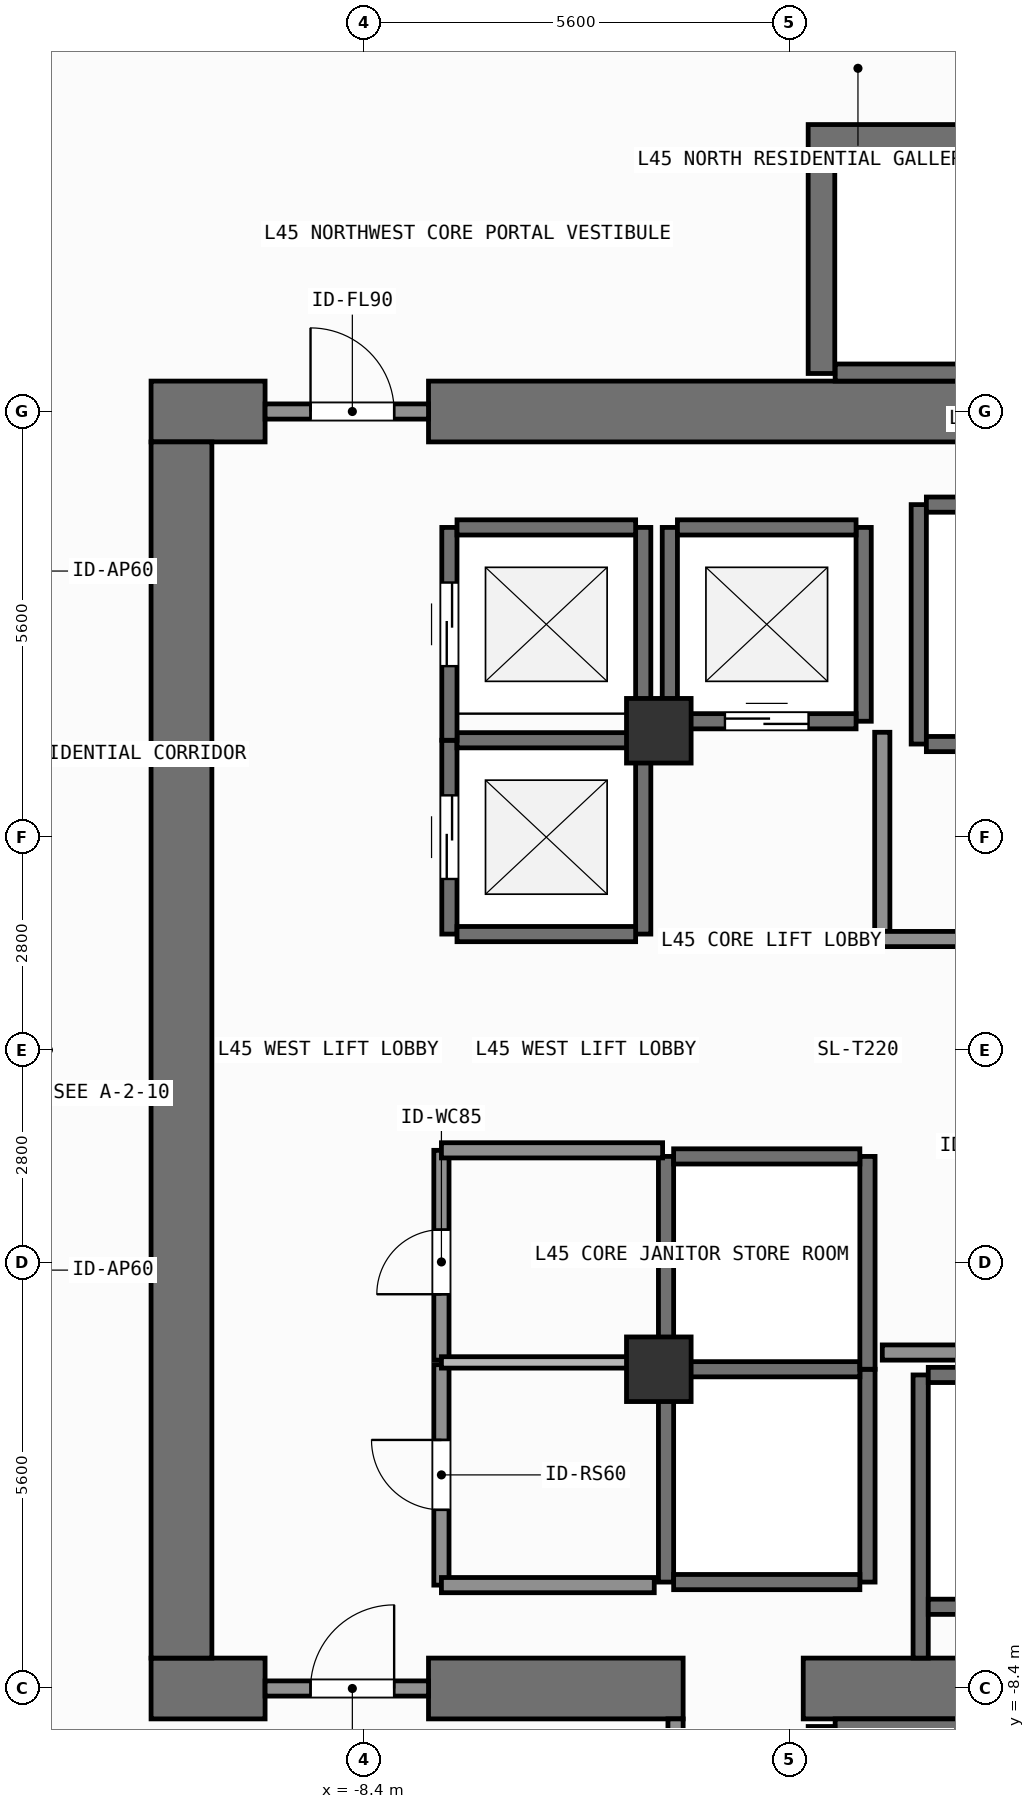
"""IFC4 building model, lengths in metres.
Left out: names, types, materials, properties, quantities, classifications, styles, units other than length and angle.
Written with IfcOpenShell. Run it as: python <this file> out.ifc"""

import sys

from ifc_helpers import new_model, si_unit, direction, frame, frame_2d, origin, origin_2d, place, context, subcontext, project, spatial, rectangle, extrude, element, fill, save


model = new_model("IFC4")
c1 = context("Model", 3, precision=1e-05, world=origin(), true_north=direction((0.0, 1.0)))
c2 = subcontext(c1, "Body", "Model", "MODEL_VIEW")
j1 = project(units=[si_unit("LENGTHUNIT", "METRE"), si_unit("PLANEANGLEUNIT", "RADIAN")], contexts=[c1])
p1 = place(None, origin())
s1 = spatial("IfcSite", under=j1, at=p1, CompositionType="ELEMENT")
p2 = place(p1, origin())
s2 = spatial("IfcBuilding", under=s1, at=p2, CompositionType="ELEMENT")
p3 = place(p2, frame((0.0, 0.0, 183.6)))
s3 = spatial("IfcBuildingStorey", under=s2, at=p3, CompositionType="ELEMENT", Elevation=183.6)
p4 = place(p3, frame((-11.2, -8.4, 0.0), z_axis=(0.0, 0.0, 1.0), x_axis=(1.0, 0.0, 0.0)))
e1 = element("IfcWall", 1, at=p4, inside=s3, PredefinedType="SHEAR", context=c2, shape_type="SweptSolid", body=[
    extrude(rectangle(XDim=1.5, YDim=0.8, at=frame_2d((0.75, 0.0))), origin(), (0.0, 0.0, 1.0), 3.9),
])
p5 = place(p3, frame((-7.55, -8.4, 0.0), z_axis=(0.0, 0.0, 1.0), x_axis=(1.0, 0.0, 0.0)))
e2 = element("IfcWall", 2, at=p5, inside=s3, PredefinedType="SHEAR", context=c2, shape_type="SweptSolid", body=[
    extrude(rectangle(XDim=3.35, YDim=0.8, at=frame_2d((1.675, 0.0))), origin(), (0.0, 0.0, 1.0), 3.9),
])
p6 = place(p3, frame((-2.62, -8.4, 0.0), z_axis=(0.0, 0.0, 1.0), x_axis=(1.0, 0.0, 0.0)))
e3 = element("IfcWall", 3, at=p6, inside=s3, PredefinedType="SHEAR", context=c2, shape_type="SweptSolid", body=[
    extrude(rectangle(XDim=7.27, YDim=0.8, at=frame_2d((3.635, 0.0))), origin(), (0.0, 0.0, 1.0), 3.9),
])
p7 = place(p3, frame((-11.2, 8.4, 0.0), z_axis=(0.0, 0.0, 1.0), x_axis=(1.0, 0.0, 0.0)))
e4 = element("IfcWall", 4, at=p7, inside=s3, PredefinedType="SHEAR", context=c2, shape_type="SweptSolid", body=[
    extrude(rectangle(XDim=1.5, YDim=0.8, at=frame_2d((0.75, 0.0))), origin(), (0.0, 0.0, 1.0), 3.9),
])
p8 = place(p3, frame((-7.55, 8.4, 0.0), z_axis=(0.0, 0.0, 1.0), x_axis=(1.0, 0.0, 0.0)))
e5 = element("IfcWall", 5, at=p8, inside=s3, PredefinedType="SHEAR", context=c2, shape_type="SweptSolid", body=[
    extrude(rectangle(XDim=16.35, YDim=0.8, at=frame_2d((8.175, 0.0))), origin(), (0.0, 0.0, 1.0), 3.9),
])
p9 = place(p3, frame((-10.8, -8.0, 0.0), z_axis=(0.0, 0.0, 1.0), x_axis=(0.0, 1.0, 0.0)))
e6 = element("IfcWall", 6, at=p9, inside=s3, PredefinedType="SHEAR", context=c2, shape_type="SweptSolid", body=[
    extrude(rectangle(XDim=16.0, YDim=0.8, at=frame_2d((8.0, 0.0))), origin(), (0.0, 0.0, 1.0), 3.9),
])
p10 = place(p3, frame((-2.2, -8.913, 0.0), z_axis=(0.0, 0.0, 1.0), x_axis=(1.0, 0.0, 0.0)))
e7 = element("IfcWall", 7, at=p10, inside=s3, PredefinedType="SHEAR", context=c2, shape_type="SweptSolid", body=[
    extrude(rectangle(XDim=6.6, YDim=0.225, at=frame_2d((3.3, 0.0))), origin(), (0.0, 0.0, 1.0), 3.9),
])
p11 = place(p3, frame((-2.38, -11.825, 0.0), z_axis=(0.0, 0.0, 1.0), x_axis=(0.0, 1.0, 0.0)))
e8 = element("IfcWall", 8, at=p11, inside=s3, PredefinedType="SHEAR", context=c2, shape_type="SweptSolid", body=[
    extrude(rectangle(XDim=2.925, YDim=0.35, at=frame_2d((1.462, 0.0))), origin(), (0.0, 0.0, 1.0), 3.9),
])
p12 = place(p3, frame((-2.555, 12.0, 0.0), z_axis=(0.0, 0.0, 1.0), x_axis=(1.0, 0.0, 0.0)))
e9 = element("IfcWall", 9, at=p12, inside=s3, PredefinedType="SHEAR", context=c2, shape_type="SweptSolid", body=[
    extrude(rectangle(XDim=7.31, YDim=0.35, at=frame_2d((3.655, 0.0))), origin(), (0.0, 0.0, 1.0), 3.9),
])
p13 = place(p3, frame((-2.2, 8.913, 0.0), z_axis=(0.0, 0.0, 1.0), x_axis=(1.0, 0.0, 0.0)))
e10 = element("IfcWall", 10, at=p13, inside=s3, PredefinedType="SHEAR", context=c2, shape_type="SweptSolid", body=[
    extrude(rectangle(XDim=6.6, YDim=0.225, at=frame_2d((3.3, 0.0))), origin(), (0.0, 0.0, 1.0), 3.9),
])
p14 = place(p3, frame((-2.38, 8.9, 0.0), z_axis=(0.0, 0.0, 1.0), x_axis=(0.0, 1.0, 0.0)))
e11 = element("IfcWall", 11, at=p14, inside=s3, PredefinedType="SHEAR", context=c2, shape_type="SweptSolid", body=[
    extrude(rectangle(XDim=2.925, YDim=0.35, at=frame_2d((1.462, 0.0))), origin(), (0.0, 0.0, 1.0), 3.9),
])
for number, where, z_axis, x_axis in (
    (12, (-4.52, -4.2, 0.0), (0.0, 0.0, 1.0), (1.0, 0.0, 0.0)),
    (13, (-4.52, 4.2, 0.0), (0.0, 0.0, 1.0), (1.0, 0.0, 0.0)),
):
    element("IfcColumn", number, at=place(p3, frame(where, z_axis=z_axis, x_axis=x_axis)), inside=s3, PredefinedType="COLUMN", context=c2, shape_type="SweptSolid", body=[
        extrude(rectangle(XDim=0.85, YDim=0.85, at=origin_2d()), origin(), (0.0, 0.0, 1.0), 3.9),
    ])
p15 = place(p3, frame((-7.275, 1.525, 0.0), z_axis=(0.0, 0.0, 1.0), x_axis=(0.0, 1.0, 0.0)))
e14 = element("IfcWall", 14, at=p15, inside=s3, PredefinedType="SHEAR", context=c2, shape_type="SweptSolid", body=[
    extrude(rectangle(XDim=2.55, YDim=0.2, at=frame_2d((1.275, 0.0))), origin(), (0.0, 0.0, 1.0), 3.68),
])
p16 = place(p15, frame((0.725, 0.0, 0.0)))
e15 = element("IfcOpeningElement", 15, at=p16, cuts=e14, PredefinedType="OPENING", context=c2, shape_type="SweptSolid", body=[
    extrude(rectangle(XDim=1.1, YDim=2.2, at=frame_2d((0.55, 1.1))), frame((0.0, 0.11, 0.0), z_axis=(0.0, -1.0, 0.0), x_axis=(1.0, 0.0, 0.0)), (0.0, 0.0, 1.0), 0.22),
])
p17 = place(p3, frame((-4.725, 1.525, 0.0), z_axis=(0.0, 0.0, 1.0), x_axis=(0.0, 1.0, 0.0)))
e16 = element("IfcWall", 16, at=p17, inside=s3, PredefinedType="SHEAR", context=c2, shape_type="SweptSolid", body=[
    extrude(rectangle(XDim=2.55, YDim=0.2, at=frame_2d((1.275, 0.0))), origin(), (0.0, 0.0, 1.0), 3.68),
])
for number, where, z_axis, x_axis in (
    (17, (-7.175, 1.525, 0.0), (0.0, 0.0, 1.0), (1.0, 0.0, 0.0)),
    (18, (-7.175, 4.075, 0.0), (0.0, 0.0, 1.0), (1.0, 0.0, 0.0)),
):
    element("IfcWall", number, at=place(p3, frame(where, z_axis=z_axis, x_axis=x_axis)), inside=s3, PredefinedType="SHEAR", context=c2, shape_type="SweptSolid", body=[
        extrude(rectangle(XDim=2.35, YDim=0.2, at=frame_2d((1.175, 0.0))), origin(), (0.0, 0.0, 1.0), 3.68),
    ])
p18 = place(p3, frame((-7.275, 4.075, 0.0), z_axis=(0.0, 0.0, 1.0), x_axis=(0.0, 1.0, 0.0)))
e19 = element("IfcWall", 19, at=p18, inside=s3, PredefinedType="SHEAR", context=c2, shape_type="SweptSolid", body=[
    extrude(rectangle(XDim=2.8, YDim=0.2, at=frame_2d((1.4, 0.0))), origin(), (0.0, 0.0, 1.0), 3.68),
])
p19 = place(p18, frame((0.975, 0.0, 0.0)))
e20 = element("IfcOpeningElement", 20, at=p19, cuts=e19, PredefinedType="OPENING", context=c2, shape_type="SweptSolid", body=[
    extrude(rectangle(XDim=1.1, YDim=2.2, at=frame_2d((0.55, 1.1))), frame((0.0, 0.11, 0.0), z_axis=(0.0, -1.0, 0.0), x_axis=(1.0, 0.0, 0.0)), (0.0, 0.0, 1.0), 0.22),
])
p20 = place(p3, frame((-4.725, 4.075, 0.0), z_axis=(0.0, 0.0, 1.0), x_axis=(0.0, 1.0, 0.0)))
e21 = element("IfcWall", 21, at=p20, inside=s3, PredefinedType="SHEAR", context=c2, shape_type="SweptSolid", body=[
    extrude(rectangle(XDim=2.8, YDim=0.2, at=frame_2d((1.4, 0.0))), origin(), (0.0, 0.0, 1.0), 3.68),
])
p21 = place(p3, frame((-7.175, 6.875, 0.0), z_axis=(0.0, 0.0, 1.0), x_axis=(1.0, 0.0, 0.0)))
e22 = element("IfcWall", 22, at=p21, inside=s3, PredefinedType="SHEAR", context=c2, shape_type="SweptSolid", body=[
    extrude(rectangle(XDim=2.35, YDim=0.2, at=frame_2d((1.175, 0.0))), origin(), (0.0, 0.0, 1.0), 3.68),
])
for number, where, z_axis, x_axis in (
    (23, (-4.375, 4.325, 0.0), (0.0, 0.0, 1.0), (0.0, 1.0, 0.0)),
    (24, (-1.825, 4.325, 0.0), (0.0, 0.0, 1.0), (0.0, 1.0, 0.0)),
):
    element("IfcWall", number, at=place(p3, frame(where, z_axis=z_axis, x_axis=x_axis)), inside=s3, PredefinedType="SHEAR", context=c2, shape_type="SweptSolid", body=[
        extrude(rectangle(XDim=2.55, YDim=0.2, at=frame_2d((1.275, 0.0))), origin(), (0.0, 0.0, 1.0), 3.68),
    ])
p22 = place(p3, frame((-4.275, 4.325, 0.0), z_axis=(0.0, 0.0, 1.0), x_axis=(1.0, 0.0, 0.0)))
e25 = element("IfcWall", 25, at=p22, inside=s3, PredefinedType="SHEAR", context=c2, shape_type="SweptSolid", body=[
    extrude(rectangle(XDim=2.35, YDim=0.2, at=frame_2d((1.175, 0.0))), origin(), (0.0, 0.0, 1.0), 3.68),
])
p23 = place(p22, frame((0.625, 0.0, 0.0)))
e26 = element("IfcOpeningElement", 26, at=p23, cuts=e25, PredefinedType="OPENING", context=c2, shape_type="SweptSolid", body=[
    extrude(rectangle(XDim=1.1, YDim=2.2, at=frame_2d((0.55, 1.1))), frame((0.0, 0.11, 0.0), z_axis=(0.0, -1.0, 0.0), x_axis=(1.0, 0.0, 0.0)), (0.0, 0.0, 1.0), 0.22),
])
p24 = place(p3, frame((-4.275, 6.875, 0.0), z_axis=(0.0, 0.0, 1.0), x_axis=(1.0, 0.0, 0.0)))
e27 = element("IfcWall", 27, at=p24, inside=s3, PredefinedType="SHEAR", context=c2, shape_type="SweptSolid", body=[
    extrude(rectangle(XDim=2.35, YDim=0.2, at=frame_2d((1.175, 0.0))), origin(), (0.0, 0.0, 1.0), 3.68),
])
for number, where, z_axis, x_axis in (
    (28, (-4.425, -7.0, 0.0), (0.0, 0.0, 1.0), (0.0, 1.0, 0.0)),
    (29, (-1.775, -7.0, 0.0), (0.0, 0.0, 1.0), (0.0, 1.0, 0.0)),
):
    element("IfcWall", number, at=place(p3, frame(where, z_axis=z_axis, x_axis=x_axis)), inside=s3, PredefinedType="SHEAR", context=c2, shape_type="SweptSolid", body=[
        extrude(rectangle(XDim=2.8, YDim=0.2, at=frame_2d((1.4, 0.0))), origin(), (0.0, 0.0, 1.0), 3.68),
    ])
for number, where, z_axis, x_axis in (
    (30, (-4.325, -7.0, 0.0), (0.0, 0.0, 1.0), (1.0, 0.0, 0.0)),
    (31, (-4.325, -4.2, 0.0), (0.0, 0.0, 1.0), (1.0, 0.0, 0.0)),
):
    element("IfcWall", number, at=place(p3, frame(where, z_axis=z_axis, x_axis=x_axis)), inside=s3, PredefinedType="SHEAR", context=c2, shape_type="SweptSolid", body=[
        extrude(rectangle(XDim=2.45, YDim=0.2, at=frame_2d((1.225, 0.0))), origin(), (0.0, 0.0, 1.0), 3.68),
    ])
for number, where, z_axis, x_axis in (
    (32, (-4.425, -4.2, 0.0), (0.0, 0.0, 1.0), (0.0, 1.0, 0.0)),
    (33, (-1.775, -4.2, 0.0), (0.0, 0.0, 1.0), (0.0, 1.0, 0.0)),
):
    element("IfcWall", number, at=place(p3, frame(where, z_axis=z_axis, x_axis=x_axis)), inside=s3, PredefinedType="SHEAR", context=c2, shape_type="SweptSolid", body=[
        extrude(rectangle(XDim=2.8, YDim=0.2, at=frame_2d((1.4, 0.0))), origin(), (0.0, 0.0, 1.0), 3.68),
    ])
p25 = place(p3, frame((-4.325, -1.4, 0.0), z_axis=(0.0, 0.0, 1.0), x_axis=(1.0, 0.0, 0.0)))
e34 = element("IfcWall", 34, at=p25, inside=s3, PredefinedType="SHEAR", context=c2, shape_type="SweptSolid", body=[
    extrude(rectangle(XDim=2.45, YDim=0.2, at=frame_2d((1.225, 0.0))), origin(), (0.0, 0.0, 1.0), 3.68),
])
p26 = place(p3, frame((-1.1, 4.025, 0.0), z_axis=(0.0, 0.0, 1.0), x_axis=(0.0, 1.0, 0.0)))
e35 = element("IfcWall", 35, at=p26, inside=s3, PredefinedType="SHEAR", context=c2, shape_type="SweptSolid", body=[
    extrude(rectangle(XDim=3.15, YDim=0.2, at=frame_2d((1.575, 0.0))), origin(), (0.0, 0.0, 1.0), 3.68),
])
for number, where, z_axis, x_axis in (
    (36, (-1.0, 4.025, 0.0), (0.0, 0.0, 1.0), (1.0, 0.0, 0.0)),
    (37, (-1.0, 7.175, 0.0), (0.0, 0.0, 1.0), (1.0, 0.0, 0.0)),
):
    element("IfcWall", number, at=place(p3, frame(where, z_axis=z_axis, x_axis=x_axis)), inside=s3, PredefinedType="SHEAR", context=c2, shape_type="SweptSolid", body=[
        extrude(rectangle(XDim=2.4, YDim=0.2, at=frame_2d((1.2, 0.0))), origin(), (0.0, 0.0, 1.0), 3.68),
    ])
p27 = place(p3, frame((-1.075, -8.0, 0.0), z_axis=(0.0, 0.0, 1.0), x_axis=(0.0, 1.0, 0.0)))
e38 = element("IfcWall", 38, at=p27, inside=s3, PredefinedType="SHEAR", context=c2, shape_type="SweptSolid", body=[
    extrude(rectangle(XDim=3.725, YDim=0.2, at=frame_2d((1.863, 0.0))), origin(), (0.0, 0.0, 1.0), 3.68),
])
for number, where, z_axis, x_axis in (
    (39, (-0.975, -7.325, 0.0), (0.0, 0.0, 1.0), (1.0, 0.0, 0.0)),
    (40, (-0.975, -4.275, 0.0), (0.0, 0.0, 1.0), (1.0, 0.0, 0.0)),
):
    element("IfcWall", number, at=place(p3, frame(where, z_axis=z_axis, x_axis=x_axis)), inside=s3, PredefinedType="SHEAR", context=c2, shape_type="SweptSolid", body=[
        extrude(rectangle(XDim=2.35, YDim=0.2, at=frame_2d((1.175, 0.0))), origin(), (0.0, 0.0, 1.0), 3.68),
    ])
p28 = place(p3, frame((-9.7, -8.4, 0.0), z_axis=(0.0, 0.0, 1.0), x_axis=(1.0, 0.0, 0.0)))
e41 = element("IfcWall", 41, at=p28, inside=s3, PredefinedType="SOLIDWALL", context=c2, shape_type="SweptSolid", body=[
    extrude(rectangle(XDim=2.15, YDim=0.2, at=frame_2d((1.075, 0.0))), origin(), (0.0, 0.0, 1.0), 2.82),
])
p29 = place(p28, frame((0.598, 0.0, 0.0)))
e42 = element("IfcOpeningElement", 42, at=p29, cuts=e41, PredefinedType="OPENING", context=c2, shape_type="SweptSolid", body=[
    extrude(rectangle(XDim=1.1, YDim=2.15, at=frame_2d((0.55, 1.075))), frame((0.0, 0.11, 0.0), z_axis=(0.0, -1.0, 0.0), x_axis=(1.0, 0.0, 0.0)), (0.0, 0.0, 1.0), 0.22),
])
p30 = place(p3, frame((-9.7, 8.4, 0.0), z_axis=(0.0, 0.0, 1.0), x_axis=(1.0, 0.0, 0.0)))
e43 = element("IfcWall", 43, at=p30, inside=s3, PredefinedType="SOLIDWALL", context=c2, shape_type="SweptSolid", body=[
    extrude(rectangle(XDim=2.15, YDim=0.2, at=frame_2d((1.075, 0.0))), origin(), (0.0, 0.0, 1.0), 2.82),
])
p31 = place(p30, frame((0.598, 0.0, 0.0)))
e44 = element("IfcOpeningElement", 44, at=p31, cuts=e43, PredefinedType="OPENING", context=c2, shape_type="SweptSolid", body=[
    extrude(rectangle(XDim=1.1, YDim=2.15, at=frame_2d((0.55, 1.075))), frame((0.0, 0.11, 0.0), z_axis=(0.0, -1.0, 0.0), x_axis=(1.0, 0.0, 0.0)), (0.0, 0.0, 1.0), 0.22),
])
p32 = place(p3, frame((-7.38, -7.04, 0.0), z_axis=(0.0, 0.0, 1.0), x_axis=(0.0, 1.0, 0.0)))
e45 = element("IfcWall", 45, at=p32, inside=s3, PredefinedType="SOLIDWALL", context=c2, shape_type="SweptSolid", body=[
    extrude(rectangle(XDim=2.9, YDim=0.2, at=frame_2d((1.45, 0.0))), origin(), (0.0, 0.0, 1.0), 3.68),
])
p33 = place(p32, frame((0.99, 0.0, 0.0)))
e46 = element("IfcOpeningElement", 46, at=p33, cuts=e45, PredefinedType="OPENING", context=c2, shape_type="SweptSolid", body=[
    extrude(rectangle(XDim=0.92, YDim=2.1, at=frame_2d((0.46, 1.05))), frame((0.0, 0.11, 0.0), z_axis=(0.0, -1.0, 0.0), x_axis=(1.0, 0.0, 0.0)), (0.0, 0.0, 1.0), 0.22),
])
p34 = place(p3, frame((-7.38, -4.08, 0.0), z_axis=(0.0, 0.0, 1.0), x_axis=(0.0, 1.0, 0.0)))
e47 = element("IfcWall", 47, at=p34, inside=s3, PredefinedType="SOLIDWALL", context=c2, shape_type="SweptSolid", body=[
    extrude(rectangle(XDim=2.76, YDim=0.2, at=frame_2d((1.38, 0.0))), origin(), (0.0, 0.0, 1.0), 3.68),
])
p35 = place(p34, frame((0.867, 0.0, 0.0)))
e48 = element("IfcOpeningElement", 48, at=p35, cuts=e47, PredefinedType="OPENING", context=c2, shape_type="SweptSolid", body=[
    extrude(rectangle(XDim=0.85, YDim=2.1, at=frame_2d((0.425, 1.05))), frame((0.0, 0.11, 0.0), z_axis=(0.0, -1.0, 0.0), x_axis=(1.0, 0.0, 0.0)), (0.0, 0.0, 1.0), 0.22),
])
p36 = place(p3, frame((-4.3, -12.06, 0.0), z_axis=(0.0, 0.0, 1.0), x_axis=(0.0, 1.0, 0.0)))
e49 = element("IfcWall", 49, at=p36, inside=s3, PredefinedType="SOLIDWALL", context=c2, shape_type="SweptSolid", body=[
    extrude(rectangle(XDim=3.26, YDim=0.2, at=frame_2d((1.63, 0.0))), origin(), (0.0, 0.0, 1.0), 3.68),
])
p37 = place(p3, frame((-7.38, -1.32, 0.0), z_axis=(0.0, 0.0, 1.0), x_axis=(1.0, 0.0, 0.0)))
e50 = element("IfcWall", 50, at=p37, inside=s3, PredefinedType="SOLIDWALL", context=c2, shape_type="SweptSolid", body=[
    extrude(rectangle(XDim=2.91, YDim=0.2, at=frame_2d((1.455, 0.0))), origin(), (0.0, 0.0, 1.0), 3.68),
])
p38 = place(p3, frame((-1.58, 1.48, 0.0), z_axis=(0.0, 0.0, 1.0), x_axis=(0.0, 1.0, 0.0)))
e51 = element("IfcWall", 51, at=p38, inside=s3, PredefinedType="SOLIDWALL", context=c2, shape_type="SweptSolid", body=[
    extrude(rectangle(XDim=2.7, YDim=0.2, at=frame_2d((1.35, 0.0))), origin(), (0.0, 0.0, 1.0), 3.68),
])
for number, where, z_axis, x_axis in (
    (52, (-1.58, -3.98, 0.0), (0.0, 0.0, 1.0), (1.0, 0.0, 0.0)),
    (53, (-1.58, 1.46, 0.0), (0.0, 0.0, 1.0), (1.0, 0.0, 0.0)),
):
    element("IfcWall", number, at=place(p3, frame(where, z_axis=z_axis, x_axis=x_axis)), inside=s3, PredefinedType="SOLIDWALL", context=c2, shape_type="SweptSolid", body=[
        extrude(rectangle(XDim=3.19, YDim=0.2, at=frame_2d((1.595, 0.0))), origin(), (0.0, 0.0, 1.0), 3.68),
    ])
p39 = place(p3, frame((-7.38, -7.04, 0.0), z_axis=(0.0, 0.0, 1.0), x_axis=(1.0, 0.0, 0.0)))
e54 = element("IfcWall", 54, at=p39, inside=s3, PredefinedType="SOLIDWALL", context=c2, shape_type="SweptSolid", body=[
    extrude(rectangle(XDim=2.8, YDim=0.2, at=frame_2d((1.4, 0.0))), origin(), (0.0, 0.0, 1.0), 3.68),
])
p40 = place(p3, frame((-7.38, -4.11, 0.0), z_axis=(0.0, 0.0, 1.0), x_axis=(1.0, 0.0, 0.0)))
e55 = element("IfcWall", 55, at=p40, inside=s3, PredefinedType="PARTITIONING", context=c2, shape_type="SweptSolid", body=[
    extrude(rectangle(XDim=2.8, YDim=0.15, at=frame_2d((1.4, 0.0))), origin(), (0.0, 0.0, 1.0), 3.68),
])
p41 = place(p16, origin())
e56 = element("IfcDoor", 56, at=p41, inside=s3, OperationType="SLIDING_TO_LEFT", PredefinedType="DOOR", context=c2, shape_type="SweptSolid", body=[
    extrude(rectangle(XDim=1.1, YDim=2.2, at=frame_2d((0.55, 1.1))), frame((0.0, 0.025, 0.0), z_axis=(0.0, -1.0, 0.0), x_axis=(1.0, 0.0, 0.0)), (0.0, 0.0, 1.0), 0.05),
])
fill(e15, e56)
p42 = place(p19, origin())
e57 = element("IfcDoor", 57, at=p42, inside=s3, OperationType="SLIDING_TO_LEFT", PredefinedType="DOOR", context=c2, shape_type="SweptSolid", body=[
    extrude(rectangle(XDim=1.1, YDim=2.2, at=frame_2d((0.55, 1.1))), frame((0.0, 0.025, 0.0), z_axis=(0.0, -1.0, 0.0), x_axis=(1.0, 0.0, 0.0)), (0.0, 0.0, 1.0), 0.05),
])
fill(e20, e57)
p43 = place(p23, origin())
e58 = element("IfcDoor", 58, at=p43, inside=s3, OperationType="SLIDING_TO_LEFT", PredefinedType="DOOR", context=c2, shape_type="SweptSolid", body=[
    extrude(rectangle(XDim=1.1, YDim=2.2, at=frame_2d((0.55, 1.1))), frame((0.0, 0.025, 0.0), z_axis=(0.0, -1.0, 0.0), x_axis=(1.0, 0.0, 0.0)), (0.0, 0.0, 1.0), 0.05),
])
fill(e26, e58)
p44 = place(p29, origin())
e59 = element("IfcDoor", 59, at=p44, inside=s3, OperationType="SINGLE_SWING_RIGHT", PredefinedType="DOOR", context=c2, shape_type="SweptSolid", body=[
    extrude(rectangle(XDim=1.1, YDim=2.15, at=frame_2d((0.55, 1.075))), frame((0.0, 0.025, 0.0), z_axis=(0.0, -1.0, 0.0), x_axis=(1.0, 0.0, 0.0)), (0.0, 0.0, 1.0), 0.05),
])
fill(e42, e59)
p45 = place(p31, origin())
e60 = element("IfcDoor", 60, at=p45, inside=s3, OperationType="SINGLE_SWING_LEFT", PredefinedType="DOOR", context=c2, shape_type="SweptSolid", body=[
    extrude(rectangle(XDim=1.1, YDim=2.15, at=frame_2d((0.55, 1.075))), frame((0.0, 0.025, 0.0), z_axis=(0.0, -1.0, 0.0), x_axis=(1.0, 0.0, 0.0)), (0.0, 0.0, 1.0), 0.05),
])
fill(e44, e60)
p46 = place(p33, origin())
e61 = element("IfcDoor", 61, at=p46, inside=s3, OperationType="SINGLE_SWING_RIGHT", PredefinedType="DOOR", context=c2, shape_type="SweptSolid", body=[
    extrude(rectangle(XDim=0.92, YDim=2.1, at=frame_2d((0.46, 1.05))), frame((0.0, 0.025, 0.0), z_axis=(0.0, -1.0, 0.0), x_axis=(1.0, 0.0, 0.0)), (0.0, 0.0, 1.0), 0.05),
])
fill(e46, e61)
p47 = place(p35, origin())
e62 = element("IfcDoor", 62, at=p47, inside=s3, OperationType="SINGLE_SWING_LEFT", PredefinedType="DOOR", context=c2, shape_type="SweptSolid", body=[
    extrude(rectangle(XDim=0.85, YDim=2.1, at=frame_2d((0.425, 1.05))), frame((0.0, 0.025, 0.0), z_axis=(0.0, -1.0, 0.0), x_axis=(1.0, 0.0, 0.0)), (0.0, 0.0, 1.0), 0.05),
])
fill(e48, e62)
save(model, sys.argv[1])
